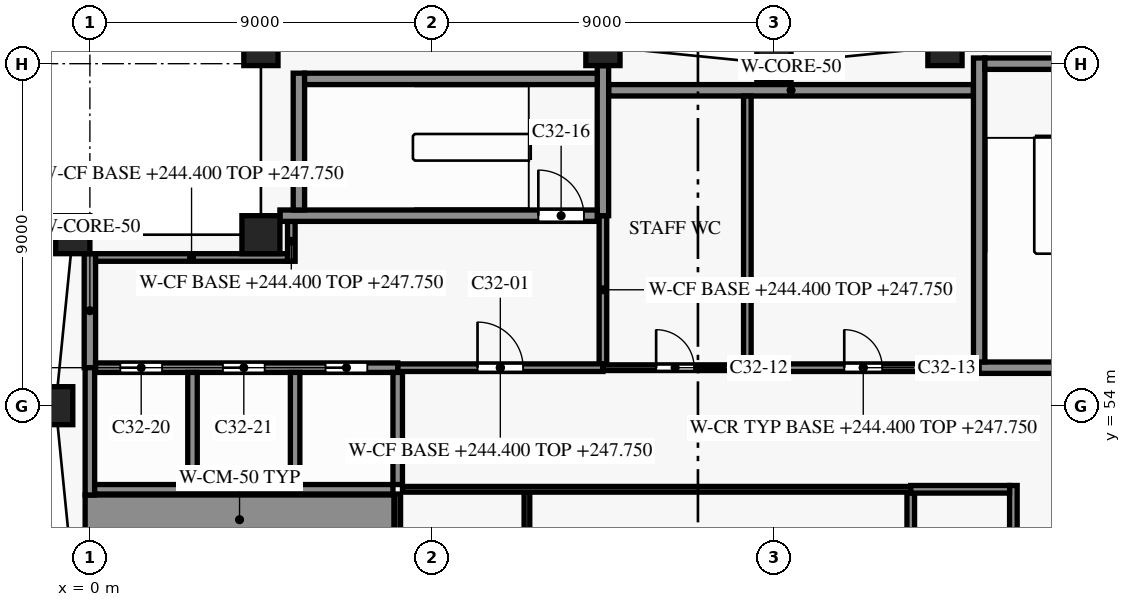
"""IFC4 building model, lengths in metres.
Left out: names, types, materials, properties, quantities, classifications, styles, units other than length and angle.
Written with IfcOpenShell. Run it as: python <this file> out.ifc"""

import sys

from ifc_helpers import new_model, si_unit, direction, frame, frame_2d, origin, origin_2d, place, context, subcontext, project, spatial, rectangle, extrude, element, fill, save


model = new_model("IFC4")
c1 = context("Model", 3, precision=1e-05, world=origin(), true_north=direction((0.0, 1.0)))
c2 = subcontext(c1, "Body", "Model", "MODEL_VIEW")
j1 = project(units=[si_unit("LENGTHUNIT", "METRE"), si_unit("PLANEANGLEUNIT", "RADIAN")], contexts=[c1])
p1 = place(None, origin())
s1 = spatial("IfcSite", under=j1, at=p1, CompositionType="ELEMENT")
p2 = place(p1, origin())
s2 = spatial("IfcBuilding", under=s1, at=p2, CompositionType="ELEMENT")
p3 = place(p2, frame((0.0, 0.0, 244.4)))
s3 = spatial("IfcBuildingStorey", under=s2, at=p3, CompositionType="ELEMENT", Elevation=244.4)
for number, where, z_axis, x_axis in (
    (1, (22.5, 63.45, 0.0), (0.0, 0.0, 1.0), (-0.995, -0.1, 0.0)),
    (2, (18.0, 63.0, 0.0), (0.0, 0.0, 1.0), (-1.0, 0.0, 0.0)),
    (3, (13.5, 63.45, 0.0), (0.0, 0.0, 1.0), (-0.995, 0.1, 0.0)),
    (4, (4.5, 63.45, 0.0), (0.0, 0.0, 1.0), (-0.995, -0.1, 0.0)),
    (5, (-0.45, 58.5, 0.0), (0.0, 0.0, 1.0), (-0.1, -0.995, 0.0)),
    (6, (-0.9, 54.0, 0.0), (0.0, 0.0, 1.0), (0.0, -1.0, 0.0)),
):
    element("IfcColumn", number, at=place(p3, frame(where, z_axis=z_axis, x_axis=x_axis)), inside=s3, PredefinedType="COLUMN", context=c2, shape_type="SweptSolid", body=[
        extrude(rectangle(XDim=0.9, YDim=1.0, at=origin_2d()), origin(), (0.0, 0.0, 1.0), 3.8),
    ])
p4 = place(p3, frame((4.5, 58.5, 0.0), z_axis=(0.0, 0.0, 1.0), x_axis=(1.0, 0.0, 0.0)))
e7 = element("IfcColumn", 7, at=p4, inside=s3, PredefinedType="COLUMN", context=c2, shape_type="SweptSolid", body=[
    extrude(rectangle(XDim=1.0, YDim=1.0, at=origin_2d()), origin(), (0.0, 0.0, 1.0), 3.8),
])
p5 = place(p3, frame((-0.125, 51.0, 0.0), z_axis=(0.0, 0.0, 1.0), x_axis=(1.0, 0.0, 0.0)))
e8 = element("IfcWall", 8, at=p5, inside=s3, PredefinedType="SHEAR", context=c2, shape_type="SweptSolid", body=[
    extrude(rectangle(XDim=8.125, YDim=1.3, at=frame_2d((4.062, 0.0))), origin(), (0.0, 0.0, 1.0), 3.5),
])
p6 = place(p3, frame((8.225, 51.8, 0.0), z_axis=(0.0, 0.0, 1.0), x_axis=(1.0, 0.0, 0.0)))
e9 = element("IfcWall", 9, at=p6, inside=s3, PredefinedType="PARTITIONING", context=c2, shape_type="SweptSolid", body=[
    extrude(rectangle(XDim=13.375, YDim=0.15, at=frame_2d((6.688, 0.0))), origin(), (0.0, 0.0, 1.0), 3.35),
])
p7 = place(p3, frame((21.6, 51.8, 0.0), z_axis=(0.0, 0.0, 1.0), x_axis=(1.0, 0.0, 0.0)))
e10 = element("IfcWall", 10, at=p7, inside=s3, PredefinedType="PARTITIONING", context=c2, shape_type="SweptSolid", body=[
    extrude(rectangle(XDim=2.6, YDim=0.2, at=frame_2d((1.3, 0.0))), origin(), (0.0, 0.0, 1.0), 3.35),
])
p8 = place(p3, frame((0.125, 51.8, 0.0), z_axis=(0.0, 0.0, 1.0), x_axis=(1.0, 0.0, 0.0)))
e11 = element("IfcWall", 11, at=p8, inside=s3, PredefinedType="SHEAR", context=c2, shape_type="SweptSolid", body=[
    extrude(rectangle(XDim=7.85, YDim=0.25, at=frame_2d((3.925, 0.0))), origin(), (0.0, 0.0, 1.0), 3.5),
])
p9 = place(p3, frame((8.1, 55.0, 0.0), z_axis=(0.0, 0.0, 1.0), x_axis=(1.0, 0.0, 0.0)))
e12 = element("IfcWall", 12, at=p9, inside=s3, PredefinedType="PARTITIONING", context=c2, shape_type="SweptSolid", body=[
    extrude(rectangle(XDim=5.4, YDim=0.2, at=frame_2d((2.7, 0.0))), origin(), (0.0, 0.0, 1.0), 3.35),
])
p10 = place(p9, frame((2.1, 0.0, 0.0)))
e13 = element("IfcOpeningElement", 13, at=p10, cuts=e12, PredefinedType="OPENING", context=c2, shape_type="SweptSolid", body=[
    extrude(rectangle(XDim=1.2, YDim=2.2, at=frame_2d((0.6, 1.1))), frame((0.0, 0.11, 0.0), z_axis=(0.0, -1.0, 0.0), x_axis=(1.0, 0.0, 0.0)), (0.0, 0.0, 1.0), 0.22),
])
p11 = place(p3, frame((13.5, 55.0, 0.0), z_axis=(0.0, 0.0, 1.0), x_axis=(1.0, 0.0, 0.0)))
e14 = element("IfcWall", 14, at=p11, inside=s3, PredefinedType="PARTITIONING", context=c2, shape_type="SweptSolid", body=[
    extrude(rectangle(XDim=3.8, YDim=0.15, at=frame_2d((1.9, 0.0))), origin(), (0.0, 0.0, 1.0), 3.35),
])
p12 = place(p11, frame((1.4, 0.0, 0.0)))
e15 = element("IfcOpeningElement", 15, at=p12, cuts=e14, PredefinedType="OPENING", context=c2, shape_type="SweptSolid", body=[
    extrude(rectangle(XDim=1.0, YDim=2.1, at=frame_2d((0.5, 1.05))), frame((0.0, 0.085, 0.0), z_axis=(0.0, -1.0, 0.0), x_axis=(1.0, 0.0, 0.0)), (0.0, 0.0, 1.0), 0.17),
])
p13 = place(p3, frame((17.3, 55.0, 0.0), z_axis=(0.0, 0.0, 1.0), x_axis=(1.0, 0.0, 0.0)))
e16 = element("IfcWall", 16, at=p13, inside=s3, PredefinedType="PARTITIONING", context=c2, shape_type="SweptSolid", body=[
    extrude(rectangle(XDim=6.1, YDim=0.2, at=frame_2d((3.05, 0.0))), origin(), (0.0, 0.0, 1.0), 3.35),
])
p14 = place(p13, frame((2.55, 0.0, 0.0)))
e17 = element("IfcOpeningElement", 17, at=p14, cuts=e16, PredefinedType="OPENING", context=c2, shape_type="SweptSolid", body=[
    extrude(rectangle(XDim=1.0, YDim=2.1, at=frame_2d((0.5, 1.05))), frame((0.0, 0.11, 0.0), z_axis=(0.0, -1.0, 0.0), x_axis=(1.0, 0.0, 0.0)), (0.0, 0.0, 1.0), 0.22),
])
p15 = place(p3, frame((0.15, 55.0, 0.0), z_axis=(0.0, 0.0, 1.0), x_axis=(1.0, 0.0, 0.0)))
e18 = element("IfcWall", 18, at=p15, inside=s3, PredefinedType="SHEAR", context=c2, shape_type="SweptSolid", body=[
    extrude(rectangle(XDim=7.95, YDim=0.25, at=frame_2d((3.975, 0.0))), origin(), (0.0, 0.0, 1.0), 3.5),
])
p16 = place(p15, frame((0.65, 0.0, 0.0)))
e19 = element("IfcOpeningElement", 19, at=p16, cuts=e18, PredefinedType="OPENING", context=c2, shape_type="SweptSolid", body=[
    extrude(rectangle(XDim=1.1, YDim=2.1, at=frame_2d((0.55, 1.05))), frame((0.0, 0.135, 0.0), z_axis=(0.0, -1.0, 0.0), x_axis=(1.0, 0.0, 0.0)), (0.0, 0.0, 1.0), 0.27),
])
p17 = place(p15, frame((3.35, 0.0, 0.0)))
e20 = element("IfcOpeningElement", 20, at=p17, cuts=e18, PredefinedType="OPENING", context=c2, shape_type="SweptSolid", body=[
    extrude(rectangle(XDim=1.1, YDim=2.1, at=frame_2d((0.55, 1.05))), frame((0.0, 0.135, 0.0), z_axis=(0.0, -1.0, 0.0), x_axis=(1.0, 0.0, 0.0)), (0.0, 0.0, 1.0), 0.27),
])
p18 = place(p15, frame((6.05, 0.0, 0.0)))
e21 = element("IfcOpeningElement", 21, at=p18, cuts=e18, PredefinedType="OPENING", context=c2, shape_type="SweptSolid", body=[
    extrude(rectangle(XDim=1.1, YDim=2.1, at=frame_2d((0.55, 1.05))), frame((0.0, 0.135, 0.0), z_axis=(0.0, -1.0, 0.0), x_axis=(1.0, 0.0, 0.0)), (0.0, 0.0, 1.0), 0.27),
])
p19 = place(p3, frame((23.4, 55.0, 0.0), z_axis=(0.0, 0.0, 1.0), x_axis=(1.0, 0.0, 0.0)))
e22 = element("IfcWall", 22, at=p19, inside=s3, PredefinedType="SHEAR", context=c2, shape_type="SweptSolid", body=[
    extrude(rectangle(XDim=3.45, YDim=0.3, at=frame_2d((1.725, 0.0))), origin(), (0.0, 0.0, 1.0), 3.5),
])
p20 = place(p3, frame((0.15, 57.9, 0.0), z_axis=(0.0, 0.0, 1.0), x_axis=(1.0, 0.0, 0.0)))
e23 = element("IfcWall", 23, at=p20, inside=s3, PredefinedType="PARTITIONING", context=c2, shape_type="SweptSolid", body=[
    extrude(rectangle(XDim=5.05, YDim=0.2, at=frame_2d((2.525, 0.0))), origin(), (0.0, 0.0, 1.0), 3.35),
])
p21 = place(p3, frame((5.0, 59.0, 0.0), z_axis=(0.0, 0.0, 1.0), x_axis=(1.0, 0.0, 0.0)))
e24 = element("IfcWall", 24, at=p21, inside=s3, PredefinedType="SHEAR", context=c2, shape_type="SweptSolid", body=[
    extrude(rectangle(XDim=8.35, YDim=0.3, at=frame_2d((4.175, 0.0))), origin(), (0.0, 0.0, 1.0), 3.5),
])
p22 = place(p21, frame((6.8, 0.0, 0.0)))
e25 = element("IfcOpeningElement", 25, at=p22, cuts=e24, PredefinedType="OPENING", context=c2, shape_type="SweptSolid", body=[
    extrude(rectangle(XDim=1.2, YDim=2.2, at=frame_2d((0.6, 1.1))), frame((0.0, 0.16, 0.0), z_axis=(0.0, -1.0, 0.0), x_axis=(1.0, 0.0, 0.0)), (0.0, 0.0, 1.0), 0.32),
])
p23 = place(p3, frame((13.65, 62.3, 0.0), z_axis=(0.0, 0.0, 1.0), x_axis=(1.0, 0.0, 0.0)))
e26 = element("IfcWall", 26, at=p23, inside=s3, PredefinedType="SHEAR", context=c2, shape_type="SweptSolid", body=[
    extrude(rectangle(XDim=9.6, YDim=0.3, at=frame_2d((4.8, 0.0))), origin(), (0.0, 0.0, 1.0), 3.5),
])
p24 = place(p3, frame((5.65, 62.6, 0.0), z_axis=(0.0, 0.0, 1.0), x_axis=(1.0, 0.0, 0.0)))
e27 = element("IfcWall", 27, at=p24, inside=s3, PredefinedType="SHEAR", context=c2, shape_type="SweptSolid", body=[
    extrude(rectangle(XDim=7.7, YDim=0.3, at=frame_2d((3.85, 0.0))), origin(), (0.0, 0.0, 1.0), 3.5),
])
p25 = place(p3, frame((23.55, 63.0, 0.0), z_axis=(0.0, 0.0, 1.0), x_axis=(1.0, 0.0, 0.0)))
e28 = element("IfcWall", 28, at=p25, inside=s3, PredefinedType="SHEAR", context=c2, shape_type="SweptSolid", body=[
    extrude(rectangle(XDim=3.3, YDim=0.3, at=frame_2d((1.65, 0.0))), origin(), (0.0, 0.0, 1.0), 3.5),
])
p26 = place(p3, frame((0.0, 55.0, 0.0), z_axis=(0.0, 0.0, 1.0), x_axis=(0.0, 1.0, 0.0)))
e29 = element("IfcWall", 29, at=p26, inside=s3, PredefinedType="SHEAR", context=c2, shape_type="SweptSolid", body=[
    extrude(rectangle(XDim=3.0, YDim=0.3, at=frame_2d((1.5, 0.0))), origin(), (0.0, 0.0, 1.0), 3.5),
])
p27 = place(p3, frame((0.0, 51.65, 0.0), z_axis=(0.0, 0.0, 1.0), x_axis=(0.0, 1.0, 0.0)))
e30 = element("IfcWall", 30, at=p27, inside=s3, PredefinedType="SHEAR", context=c2, shape_type="SweptSolid", body=[
    extrude(rectangle(XDim=3.35, YDim=0.25, at=frame_2d((1.675, 0.0))), origin(), (0.0, 0.0, 1.0), 3.5),
])
p28 = place(p3, frame((2.7, 51.925, 0.0), z_axis=(0.0, 0.0, 1.0), x_axis=(0.0, 1.0, 0.0)))
e31 = element("IfcWall", 31, at=p28, inside=s3, PredefinedType="SHEAR", context=c2, shape_type="SweptSolid", body=[
    extrude(rectangle(XDim=2.95, YDim=0.25, at=frame_2d((1.475, 0.0))), origin(), (0.0, 0.0, 1.0), 3.5),
])
p29 = place(p3, frame((5.3, 57.8, 0.0), z_axis=(0.0, 0.0, 1.0), x_axis=(0.0, 1.0, 0.0)))
e32 = element("IfcWall", 32, at=p29, inside=s3, PredefinedType="PARTITIONING", context=c2, shape_type="SweptSolid", body=[
    extrude(rectangle(XDim=1.05, YDim=0.2, at=frame_2d((0.525, 0.0))), origin(), (0.0, 0.0, 1.0), 3.35),
])
p30 = place(p3, frame((5.4, 51.925, 0.0), z_axis=(0.0, 0.0, 1.0), x_axis=(0.0, 1.0, 0.0)))
e33 = element("IfcWall", 33, at=p30, inside=s3, PredefinedType="SHEAR", context=c2, shape_type="SweptSolid", body=[
    extrude(rectangle(XDim=2.95, YDim=0.25, at=frame_2d((1.475, 0.0))), origin(), (0.0, 0.0, 1.0), 3.5),
])
p31 = place(p3, frame((5.5, 59.15, 0.0), z_axis=(0.0, 0.0, 1.0), x_axis=(0.0, 1.0, 0.0)))
e34 = element("IfcWall", 34, at=p31, inside=s3, PredefinedType="SHEAR", context=c2, shape_type="SweptSolid", body=[
    extrude(rectangle(XDim=3.6, YDim=0.3, at=frame_2d((1.8, 0.0))), origin(), (0.0, 0.0, 1.0), 3.5),
])
p32 = place(p3, frame((8.1, 50.2, 0.0), z_axis=(0.0, 0.0, 1.0), x_axis=(0.0, 1.0, 0.0)))
e35 = element("IfcWall", 35, at=p32, inside=s3, PredefinedType="PARTITIONING", context=c2, shape_type="SweptSolid", body=[
    extrude(rectangle(XDim=1.475, YDim=0.15, at=frame_2d((0.738, 0.0))), origin(), (0.0, 0.0, 1.0), 3.35),
])
p33 = place(p3, frame((8.1, 51.925, 0.0), z_axis=(0.0, 0.0, 1.0), x_axis=(0.0, 1.0, 0.0)))
e36 = element("IfcWall", 36, at=p33, inside=s3, PredefinedType="SHEAR", context=c2, shape_type="SweptSolid", body=[
    extrude(rectangle(XDim=2.95, YDim=0.25, at=frame_2d((1.475, 0.0))), origin(), (0.0, 0.0, 1.0), 3.5),
])
p34 = place(p3, frame((11.5, 47.075, 0.0), z_axis=(0.0, 0.0, 1.0), x_axis=(0.0, 1.0, 0.0)))
e37 = element("IfcWall", 37, at=p34, inside=s3, PredefinedType="PARTITIONING", context=c2, shape_type="SweptSolid", body=[
    extrude(rectangle(XDim=4.65, YDim=0.15, at=frame_2d((2.325, 0.0))), origin(), (0.0, 0.0, 1.0), 3.35),
])
p35 = place(p3, frame((13.5, 55.1, 0.0), z_axis=(0.0, 0.0, 1.0), x_axis=(0.0, 1.0, 0.0)))
e38 = element("IfcWall", 38, at=p35, inside=s3, PredefinedType="PARTITIONING", context=c2, shape_type="SweptSolid", body=[
    extrude(rectangle(XDim=3.9, YDim=0.2, at=frame_2d((1.95, 0.0))), origin(), (0.0, 0.0, 1.0), 3.35),
])
p36 = place(p3, frame((13.5, 59.0, 0.0), z_axis=(0.0, 0.0, 1.0), x_axis=(0.0, 1.0, 0.0)))
e39 = element("IfcWall", 39, at=p36, inside=s3, PredefinedType="SHEAR", context=c2, shape_type="SweptSolid", body=[
    extrude(rectangle(XDim=3.948, YDim=0.3, at=frame_2d((1.974, 0.0))), origin(), (0.0, 0.0, 1.0), 3.5),
])
p37 = place(p3, frame((17.3, 55.1, 0.0), z_axis=(0.0, 0.0, 1.0), x_axis=(0.0, 1.0, 0.0)))
e40 = element("IfcWall", 40, at=p37, inside=s3, PredefinedType="PARTITIONING", context=c2, shape_type="SweptSolid", body=[
    extrude(rectangle(XDim=7.05, YDim=0.2, at=frame_2d((3.525, 0.0))), origin(), (0.0, 0.0, 1.0), 3.35),
])
p38 = place(p3, frame((21.6, 47.1, 0.0), z_axis=(0.0, 0.0, 1.0), x_axis=(0.0, 1.0, 0.0)))
e41 = element("IfcWall", 41, at=p38, inside=s3, PredefinedType="PARTITIONING", context=c2, shape_type="SweptSolid", body=[
    extrude(rectangle(XDim=4.6, YDim=0.2, at=frame_2d((2.3, 0.0))), origin(), (0.0, 0.0, 1.0), 3.35),
])
p39 = place(p3, frame((23.4, 55.15, 0.0), z_axis=(0.0, 0.0, 1.0), x_axis=(0.0, 1.0, 0.0)))
e42 = element("IfcWall", 42, at=p39, inside=s3, PredefinedType="SHEAR", context=c2, shape_type="SweptSolid", body=[
    extrude(rectangle(XDim=8.0, YDim=0.3, at=frame_2d((4.0, 0.0))), origin(), (0.0, 0.0, 1.0), 3.5),
])
p40 = place(p3, frame((24.3, 46.9, 0.0), z_axis=(0.0, 0.0, 1.0), x_axis=(0.0, 1.0, 0.0)))
e43 = element("IfcWall", 43, at=p40, inside=s3, PredefinedType="SHEAR", context=c2, shape_type="SweptSolid", body=[
    extrude(rectangle(XDim=5.0, YDim=0.2, at=frame_2d((2.5, 0.0))), origin(), (0.0, 0.0, 1.0), 3.5),
])
p41 = place(p10, origin())
e44 = element("IfcDoor", 44, at=p41, inside=s3, OperationType="SINGLE_SWING_RIGHT", PredefinedType="DOOR", context=c2, shape_type="SweptSolid", body=[
    extrude(rectangle(XDim=1.2, YDim=2.2, at=frame_2d((0.6, 1.1))), frame((0.0, 0.025, 0.0), z_axis=(0.0, -1.0, 0.0), x_axis=(1.0, 0.0, 0.0)), (0.0, 0.0, 1.0), 0.05),
])
fill(e13, e44)
p42 = place(p12, origin())
e45 = element("IfcDoor", 45, at=p42, inside=s3, OperationType="SINGLE_SWING_LEFT", PredefinedType="DOOR", context=c2, shape_type="SweptSolid", body=[
    extrude(rectangle(XDim=1.0, YDim=2.1, at=frame_2d((0.5, 1.05))), frame((0.0, 0.025, 0.0), z_axis=(0.0, -1.0, 0.0), x_axis=(1.0, 0.0, 0.0)), (0.0, 0.0, 1.0), 0.05),
])
fill(e15, e45)
p43 = place(p14, origin())
e46 = element("IfcDoor", 46, at=p43, inside=s3, OperationType="SINGLE_SWING_RIGHT", PredefinedType="DOOR", context=c2, shape_type="SweptSolid", body=[
    extrude(rectangle(XDim=1.0, YDim=2.1, at=frame_2d((0.5, 1.05))), frame((0.0, 0.025, 0.0), z_axis=(0.0, -1.0, 0.0), x_axis=(1.0, 0.0, 0.0)), (0.0, 0.0, 1.0), 0.05),
])
fill(e17, e46)
p44 = place(p22, origin())
e47 = element("IfcDoor", 47, at=p44, inside=s3, OperationType="SINGLE_SWING_RIGHT", PredefinedType="DOOR", context=c2, shape_type="SweptSolid", body=[
    extrude(rectangle(XDim=1.2, YDim=2.2, at=frame_2d((0.6, 1.1))), frame((0.0, 0.025, 0.0), z_axis=(0.0, -1.0, 0.0), x_axis=(1.0, 0.0, 0.0)), (0.0, 0.0, 1.0), 0.05),
])
fill(e25, e47)
p45 = place(p16, origin())
e48 = element("IfcDoor", 48, at=p45, inside=s3, OperationType="DOUBLE_DOOR_SLIDING", PredefinedType="DOOR", context=c2, shape_type="SweptSolid", body=[
    extrude(rectangle(XDim=1.1, YDim=2.1, at=frame_2d((0.55, 1.05))), frame((0.0, 0.025, 0.0), z_axis=(0.0, -1.0, 0.0), x_axis=(1.0, 0.0, 0.0)), (0.0, 0.0, 1.0), 0.05),
])
fill(e19, e48)
p46 = place(p17, origin())
e49 = element("IfcDoor", 49, at=p46, inside=s3, OperationType="DOUBLE_DOOR_SLIDING", PredefinedType="DOOR", context=c2, shape_type="SweptSolid", body=[
    extrude(rectangle(XDim=1.1, YDim=2.1, at=frame_2d((0.55, 1.05))), frame((0.0, 0.025, 0.0), z_axis=(0.0, -1.0, 0.0), x_axis=(1.0, 0.0, 0.0)), (0.0, 0.0, 1.0), 0.05),
])
fill(e20, e49)
p47 = place(p18, origin())
e50 = element("IfcDoor", 50, at=p47, inside=s3, OperationType="DOUBLE_DOOR_SLIDING", PredefinedType="DOOR", context=c2, shape_type="SweptSolid", body=[
    extrude(rectangle(XDim=1.1, YDim=2.1, at=frame_2d((0.55, 1.05))), frame((0.0, 0.025, 0.0), z_axis=(0.0, -1.0, 0.0), x_axis=(1.0, 0.0, 0.0)), (0.0, 0.0, 1.0), 0.05),
])
fill(e21, e50)
save(model, sys.argv[1])
